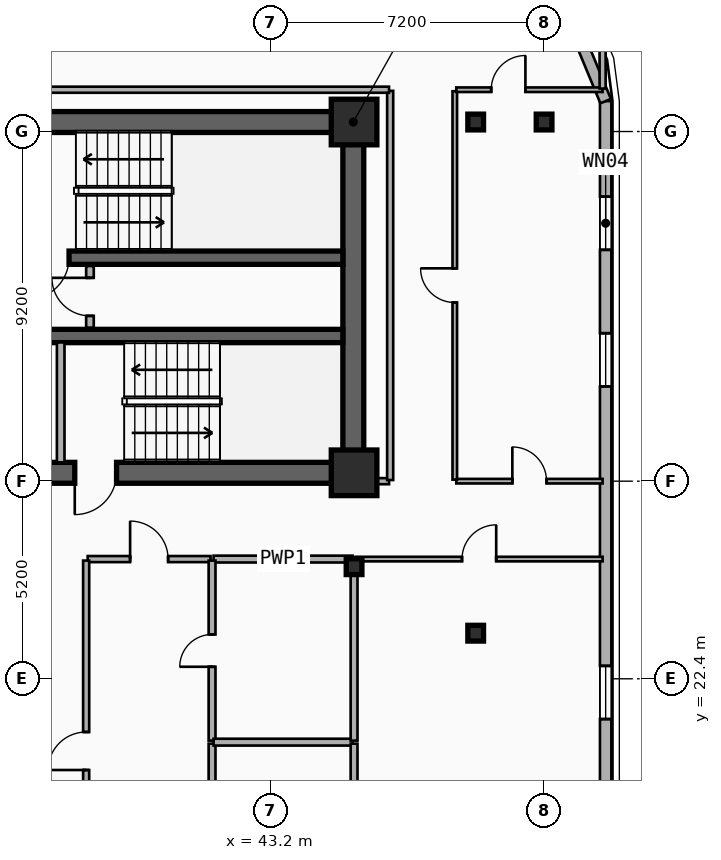
"""IFC4 building model, lengths in metres.
Left out: names, types, materials, properties, quantities, classifications, styles, units other than length and angle.
Written with IfcOpenShell. Run it as: python <this file> out.ifc"""

import sys

from ifc_helpers import new_model, si_unit, direction, frame, frame_2d, origin, origin_2d, place, context, subcontext, project, spatial, rectangle, i_section, extrude, element, fill, save


model = new_model("IFC4")
c1 = context("Model", 3, precision=1e-05, world=origin(), true_north=direction((0.0, 1.0)))
c2 = subcontext(c1, "Body", "Model", "MODEL_VIEW")
j1 = project(units=[si_unit("LENGTHUNIT", "METRE"), si_unit("PLANEANGLEUNIT", "RADIAN")], contexts=[c1])
p1 = place(None, origin())
s1 = spatial("IfcSite", under=j1, at=p1, CompositionType="ELEMENT")
p2 = place(p1, origin())
s2 = spatial("IfcBuilding", under=s1, at=p2, CompositionType="ELEMENT")
p3 = place(p2, frame((0.0, 0.0, 176.75)))
s3 = spatial("IfcBuildingStorey", under=s2, at=p3, CompositionType="ELEMENT", Elevation=176.75)
p4 = place(p3, frame((12.15, 37.05, 0.0), z_axis=(0.0, 0.0, 1.0), x_axis=(1.0, 0.0, 0.0)))
e1 = element("IfcWall", 1, at=p4, inside=s3, PredefinedType="SHEAR", context=c2, shape_type="SweptSolid", body=[
    extrude(rectangle(XDim=33.23, YDim=0.55, at=frame_2d((16.615, 0.0))), origin(), (0.0, 0.0, 1.0), 3.55),
])
p5 = place(p3, frame((45.38, 27.82, 0.0), z_axis=(0.0, 0.0, 1.0), x_axis=(-1.0, 0.0, 0.0)))
e2 = element("IfcWall", 2, at=p5, inside=s3, PredefinedType="SHEAR", context=c2, shape_type="SweptSolid", body=[
    extrude(rectangle(XDim=12.23, YDim=0.55, at=frame_2d((6.115, 0.0))), origin(), (0.0, 0.0, 1.0), 3.55),
])
p6 = place(p5, frame((9.93, 0.0, 0.0)))
e3 = element("IfcOpeningElement", 3, at=p6, cuts=e2, PredefinedType="OPENING", context=c2, shape_type="SweptSolid", body=[
    extrude(rectangle(XDim=1.1, YDim=2.15, at=frame_2d((0.55, 1.075))), frame((0.0, 0.285, 0.0), z_axis=(0.0, -1.0, 0.0), x_axis=(1.0, 0.0, 0.0)), (0.0, 0.0, 1.0), 0.57),
])
p7 = place(p5, frame((6.23, 0.0, 0.0)))
e4 = element("IfcOpeningElement", 4, at=p7, cuts=e2, PredefinedType="OPENING", context=c2, shape_type="SweptSolid", body=[
    extrude(rectangle(XDim=1.1, YDim=2.15, at=frame_2d((0.55, 1.075))), frame((0.0, 0.285, 0.0), z_axis=(0.0, -1.0, 0.0), x_axis=(1.0, 0.0, 0.0)), (0.0, 0.0, 1.0), 0.57),
])
p8 = place(p3, frame((45.38, 28.095, 0.0), z_axis=(0.0, 0.0, 1.0), x_axis=(0.0, 1.0, 0.0)))
e5 = element("IfcWall", 5, at=p8, inside=s3, PredefinedType="SHEAR", context=c2, shape_type="SweptSolid", body=[
    extrude(rectangle(XDim=8.68, YDim=0.55, at=frame_2d((4.34, 0.0))), origin(), (0.0, 0.0, 1.0), 3.55),
])
p9 = place(p3, frame((45.105, 33.48, 0.0), z_axis=(0.0, 0.0, 1.0), x_axis=(-1.0, 0.0, 0.0)))
e6 = element("IfcWall", 6, at=p9, inside=s3, PredefinedType="SHEAR", context=c2, shape_type="SweptSolid", body=[
    extrude(rectangle(XDim=8.55, YDim=0.35, at=frame_2d((4.275, 0.0))), origin(), (0.0, 0.0, 1.0), 3.55),
])
p10 = place(p9, frame((7.205, 0.0, 0.0)))
e7 = element("IfcOpeningElement", 7, at=p10, cuts=e6, PredefinedType="OPENING", context=c2, shape_type="SweptSolid", body=[
    extrude(rectangle(XDim=1.1, YDim=2.15, at=frame_2d((0.55, 1.075))), frame((0.0, 0.185, 0.0), z_axis=(0.0, -1.0, 0.0), x_axis=(1.0, 0.0, 0.0)), (0.0, 0.0, 1.0), 0.37),
])
p11 = place(p3, frame((36.555, 31.42, 0.0), z_axis=(0.0, 0.0, 1.0), x_axis=(1.0, 0.0, 0.0)))
e8 = element("IfcWall", 8, at=p11, inside=s3, PredefinedType="SHEAR", context=c2, shape_type="SweptSolid", body=[
    extrude(rectangle(XDim=8.55, YDim=0.35, at=frame_2d((4.275, 0.0))), origin(), (0.0, 0.0, 1.0), 3.55),
])
for number, where, z_axis, x_axis in (
    (9, (45.4, 27.82, 0.0), (0.0, 0.0, 1.0), (1.0, 0.0, 0.0)),
    (10, (45.4, 37.05, 0.0), (0.0, 0.0, 1.0), (1.0, 0.0, 0.0)),
):
    element("IfcColumn", number, at=place(p3, frame(where, z_axis=z_axis, x_axis=x_axis)), inside=s3, PredefinedType="COLUMN", context=c2, shape_type="SweptSolid", body=[
        extrude(rectangle(XDim=1.2, YDim=1.2, at=origin_2d()), origin(), (0.0, 0.0, 1.0), 3.55),
    ])
for number, where, z_axis, x_axis in (
    (11, (45.4, 25.35, 0.0), (0.0, 0.0, 1.0), (1.0, 0.0, 0.0)),
    (12, (48.6, 23.6, 0.0), (0.0, 0.0, 1.0), (1.0, 0.0, 0.0)),
    (13, (48.6, 37.05, 0.0), (0.0, 0.0, 1.0), (1.0, 0.0, 0.0)),
    (14, (50.4, 37.05, 0.0), (0.0, 0.0, 1.0), (1.0, 0.0, 0.0)),
):
    element("IfcColumn", number, at=place(p3, frame(where, z_axis=z_axis, x_axis=x_axis)), inside=s3, PredefinedType="COLUMN", context=c2, shape_type="SweptSolid", body=[
        extrude(i_section(OverallWidth=0.413, OverallDepth=0.415, WebThickness=0.03, FlangeThickness=0.047, FilletRadius=0.015, at=origin_2d()), origin(), (0.0, 0.0, 1.0), 3.55),
    ])
p12 = place(p3, frame((52.02, 37.6, 0.0), z_axis=(0.0, 0.0, 1.0), x_axis=(0.0, -1.0, 0.0)))
e15 = element("IfcWall", 15, at=p12, inside=s3, PredefinedType="SOLIDWALL", context=c2, shape_type="SweptSolid", body=[
    extrude(rectangle(XDim=23.0, YDim=0.3, at=frame_2d((11.5, 0.0))), origin(), (0.0, 0.0, 1.0), 3.29),
])
p13 = place(p12, frame((2.513, 0.0, 0.34)))
e16 = element("IfcOpeningElement", 16, at=p13, cuts=e15, PredefinedType="OPENING", context=c2, shape_type="SweptSolid", body=[
    extrude(rectangle(XDim=1.4, YDim=2.1, at=frame_2d((0.7, 1.05))), frame((0.0, 0.16, 0.0), z_axis=(0.0, -1.0, 0.0), x_axis=(1.0, 0.0, 0.0)), (0.0, 0.0, 1.0), 0.32),
])
p14 = place(p12, frame((6.107, 0.0, 0.34)))
e17 = element("IfcOpeningElement", 17, at=p14, cuts=e15, PredefinedType="OPENING", context=c2, shape_type="SweptSolid", body=[
    extrude(rectangle(XDim=1.4, YDim=2.1, at=frame_2d((0.7, 1.05))), frame((0.0, 0.16, 0.0), z_axis=(0.0, -1.0, 0.0), x_axis=(1.0, 0.0, 0.0)), (0.0, 0.0, 1.0), 0.32),
])
p15 = place(p12, frame((14.86, 0.0, 0.34)))
e18 = element("IfcOpeningElement", 18, at=p15, cuts=e15, PredefinedType="OPENING", context=c2, shape_type="SweptSolid", body=[
    extrude(rectangle(XDim=1.4, YDim=2.1, at=frame_2d((0.7, 1.05))), frame((0.0, 0.16, 0.0), z_axis=(0.0, -1.0, 0.0), x_axis=(1.0, 0.0, 0.0)), (0.0, 0.0, 1.0), 0.32),
])
p16 = place(p12, frame((18.77, 0.0, 0.34)))
e19 = element("IfcOpeningElement", 19, at=p16, cuts=e15, PredefinedType="OPENING", context=c2, shape_type="SweptSolid", body=[
    extrude(rectangle(XDim=1.4, YDim=2.1, at=frame_2d((0.7, 1.05))), frame((0.0, 0.16, 0.0), z_axis=(0.0, -1.0, 0.0), x_axis=(1.0, 0.0, 0.0)), (0.0, 0.0, 1.0), 0.32),
])
p17 = place(p3, frame((50.843, 40.443, 0.0), z_axis=(0.0, 0.0, 1.0), x_axis=(0.382704529509, -0.923870793506, 0.0)))
e20 = element("IfcWall", 20, at=p17, inside=s3, PredefinedType="SOLIDWALL", context=c2, shape_type="SweptSolid", body=[
    extrude(rectangle(XDim=3.077, YDim=0.3, at=frame_2d((1.538, 0.0))), origin(), (0.0, 0.0, 1.0), 3.29),
])
p18 = place(p3, frame((37.68, 28.095, 0.0), z_axis=(0.0, 0.0, 1.0), x_axis=(0.0, 1.0, 0.0)))
e21 = element("IfcWall", 21, at=p18, inside=s3, PredefinedType="PARTITIONING", context=c2, shape_type="SweptSolid", body=[
    extrude(rectangle(XDim=3.155, YDim=0.2, at=frame_2d((1.578, 0.0))), origin(), (0.0, 0.0, 1.0), 2.67),
])
p19 = place(p3, frame((38.45, 31.64, 0.0), z_axis=(0.0, 0.0, 1.0), x_axis=(0.0, 1.0, 0.0)))
e22 = element("IfcWall", 22, at=p19, inside=s3, PredefinedType="PARTITIONING", context=c2, shape_type="SweptSolid", body=[
    extrude(rectangle(XDim=1.62, YDim=0.2, at=frame_2d((0.81, 0.0))), origin(), (0.0, 0.0, 1.0), 3.29),
])
p20 = place(p19, frame((0.31, 0.0, 0.0)))
e23 = element("IfcOpeningElement", 23, at=p20, cuts=e22, PredefinedType="OPENING", context=c2, shape_type="SweptSolid", body=[
    extrude(rectangle(XDim=1.0, YDim=2.15, at=frame_2d((0.5, 1.075))), frame((0.0, 0.11, 0.0), z_axis=(0.0, -1.0, 0.0), x_axis=(1.0, 0.0, 0.0)), (0.0, 0.0, 1.0), 0.22),
])
p21 = place(p3, frame((48.09, 27.6, 0.0), z_axis=(0.0, 0.0, 1.0), x_axis=(1.0, 0.0, 0.0)))
e24 = element("IfcWall", 24, at=p21, inside=s3, PredefinedType="PARTITIONING", context=c2, shape_type="SweptSolid", body=[
    extrude(rectangle(XDim=3.85, YDim=0.12, at=frame_2d((1.925, 0.0))), origin(), (0.0, 0.0, 1.0), 2.62),
])
p22 = place(p21, frame((1.475, 0.0, 0.0)))
e25 = element("IfcOpeningElement", 25, at=p22, cuts=e24, PredefinedType="OPENING", context=c2, shape_type="SweptSolid", body=[
    extrude(rectangle(XDim=0.9, YDim=2.1, at=frame_2d((0.45, 1.05))), frame((0.0, 0.07, 0.0), z_axis=(0.0, -1.0, 0.0), x_axis=(1.0, 0.0, 0.0)), (0.0, 0.0, 1.0), 0.14),
])
p23 = place(p3, frame((38.39, 25.55, 0.0), z_axis=(0.0, 0.0, 1.0), x_axis=(1.0, 0.0, 0.0)))
e26 = element("IfcWall", 26, at=p23, inside=s3, PredefinedType="PARTITIONING", context=c2, shape_type="SweptSolid", body=[
    extrude(rectangle(XDim=3.233, YDim=0.16, at=frame_2d((1.617, 0.0))), origin(), (0.0, 0.0, 1.0), 3.29),
])
p24 = place(p23, frame((1.116, 0.0, 0.0)))
e27 = element("IfcOpeningElement", 27, at=p24, cuts=e26, PredefinedType="OPENING", context=c2, shape_type="SweptSolid", body=[
    extrude(rectangle(XDim=1.0, YDim=2.15, at=frame_2d((0.5, 1.075))), frame((0.0, 0.09, 0.0), z_axis=(0.0, -1.0, 0.0), x_axis=(1.0, 0.0, 0.0)), (0.0, 0.0, 1.0), 0.18),
])
p25 = place(p3, frame((41.703, 25.55, 0.0), z_axis=(0.0, 0.0, 1.0), x_axis=(1.0, 0.0, 0.0)))
e28 = element("IfcWall", 28, at=p25, inside=s3, PredefinedType="PLUMBINGWALL", context=c2, shape_type="SweptSolid", body=[
    extrude(rectangle(XDim=3.657, YDim=0.18, at=frame_2d((1.829, 0.0))), origin(), (0.0, 0.0, 1.0), 2.37),
])
p26 = place(p3, frame((45.44, 25.55, 0.0), z_axis=(0.0, 0.0, 1.0), x_axis=(1.0, 0.0, 0.0)))
e29 = element("IfcWall", 29, at=p26, inside=s3, PredefinedType="PARTITIONING", context=c2, shape_type="SweptSolid", body=[
    extrude(rectangle(XDim=6.5, YDim=0.12, at=frame_2d((3.25, 0.0))), origin(), (0.0, 0.0, 1.0), 2.37),
])
p27 = place(p26, frame((2.8, 0.0, 0.0)))
e30 = element("IfcOpeningElement", 30, at=p27, cuts=e29, PredefinedType="OPENING", context=c2, shape_type="SweptSolid", body=[
    extrude(rectangle(XDim=0.9, YDim=2.1, at=frame_2d((0.45, 1.05))), frame((0.0, 0.07, 0.0), z_axis=(0.0, -1.0, 0.0), x_axis=(1.0, 0.0, 0.0)), (0.0, 0.0, 1.0), 0.14),
])
p28 = place(p3, frame((48.05, 27.64, 0.0), z_axis=(0.0, 0.0, 1.0), x_axis=(0.0, 1.0, 0.0)))
e31 = element("IfcWall", 31, at=p28, inside=s3, PredefinedType="PARTITIONING", context=c2, shape_type="SweptSolid", body=[
    extrude(rectangle(XDim=10.22, YDim=0.12, at=frame_2d((5.11, 0.0))), origin(), (0.0, 0.0, 1.0), 2.77),
])
p29 = place(p28, frame((4.66, 0.0, 0.0)))
e32 = element("IfcOpeningElement", 32, at=p29, cuts=e31, PredefinedType="OPENING", context=c2, shape_type="SweptSolid", body=[
    extrude(rectangle(XDim=0.9, YDim=2.1, at=frame_2d((0.45, 1.05))), frame((0.0, 0.07, 0.0), z_axis=(0.0, -1.0, 0.0), x_axis=(1.0, 0.0, 0.0)), (0.0, 0.0, 1.0), 0.14),
])
p30 = place(p3, frame((48.09, 37.9, 0.0), z_axis=(0.0, 0.0, 1.0), x_axis=(1.0, 0.0, 0.0)))
e33 = element("IfcWall", 33, at=p30, inside=s3, PredefinedType="PARTITIONING", context=c2, shape_type="SweptSolid", body=[
    extrude(rectangle(XDim=3.85, YDim=0.12, at=frame_2d((1.925, 0.0))), origin(), (0.0, 0.0, 1.0), 3.29),
])
p31 = place(p30, frame((0.919, 0.0, 0.0)))
e34 = element("IfcOpeningElement", 34, at=p31, cuts=e33, PredefinedType="OPENING", context=c2, shape_type="SweptSolid", body=[
    extrude(rectangle(XDim=0.9, YDim=2.1, at=frame_2d((0.45, 1.05))), frame((0.0, 0.07, 0.0), z_axis=(0.0, -1.0, 0.0), x_axis=(1.0, 0.0, 0.0)), (0.0, 0.0, 1.0), 0.14),
])
p32 = place(p3, frame((38.35, 15.49, 0.0), z_axis=(0.0, 0.0, 1.0), x_axis=(0.0, 1.0, 0.0)))
e35 = element("IfcWall", 35, at=p32, inside=s3, PredefinedType="PARTITIONING", context=c2, shape_type="SweptSolid", body=[
    extrude(rectangle(XDim=10.02, YDim=0.16, at=frame_2d((5.01, 0.0))), origin(), (0.0, 0.0, 1.0), 2.77),
])
p33 = place(p32, frame((4.51, 0.0, 0.0)))
e36 = element("IfcOpeningElement", 36, at=p33, cuts=e35, PredefinedType="OPENING", context=c2, shape_type="SweptSolid", body=[
    extrude(rectangle(XDim=1.0, YDim=2.15, at=frame_2d((0.5, 1.075))), frame((0.0, 0.09, 0.0), z_axis=(0.0, -1.0, 0.0), x_axis=(1.0, 0.0, 0.0)), (0.0, 0.0, 1.0), 0.18),
])
p34 = place(p3, frame((41.663, 14.313, 0.0), z_axis=(0.0, 0.0, 1.0), x_axis=(0.0, 1.0, 0.0)))
e37 = element("IfcWall", 37, at=p34, inside=s3, PredefinedType="PLUMBINGWALL", context=c2, shape_type="SweptSolid", body=[
    extrude(rectangle(XDim=6.38, YDim=0.18, at=frame_2d((3.19, 0.0))), origin(), (0.0, 0.0, 1.0), 2.77),
])
p35 = place(p34, frame((2.69, 0.0, 0.0)))
e38 = element("IfcOpeningElement", 38, at=p35, cuts=e37, PredefinedType="OPENING", context=c2, shape_type="SweptSolid", body=[
    extrude(rectangle(XDim=1.0, YDim=2.15, at=frame_2d((0.5, 1.075))), frame((0.0, 0.1, 0.0), z_axis=(0.0, -1.0, 0.0), x_axis=(1.0, 0.0, 0.0)), (0.0, 0.0, 1.0), 0.2),
])
p36 = place(p3, frame((41.663, 20.773, 0.0), z_axis=(0.0, 0.0, 1.0), x_axis=(0.0, 1.0, 0.0)))
e39 = element("IfcWall", 39, at=p36, inside=s3, PredefinedType="PLUMBINGWALL", context=c2, shape_type="SweptSolid", body=[
    extrude(rectangle(XDim=4.737, YDim=0.18, at=frame_2d((2.369, 0.0))), origin(), (0.0, 0.0, 1.0), 2.77),
])
p37 = place(p36, frame((1.944, 0.0, 0.0)))
e40 = element("IfcOpeningElement", 40, at=p37, cuts=e39, PredefinedType="OPENING", context=c2, shape_type="SweptSolid", body=[
    extrude(rectangle(XDim=0.85, YDim=2.1, at=frame_2d((0.425, 1.05))), frame((0.0, 0.1, 0.0), z_axis=(0.0, -1.0, 0.0), x_axis=(1.0, 0.0, 0.0)), (0.0, 0.0, 1.0), 0.2),
])
p38 = place(p3, frame((41.703, 20.733, 0.0), z_axis=(0.0, 0.0, 1.0), x_axis=(1.0, 0.0, 0.0)))
e41 = element("IfcWall", 41, at=p38, inside=s3, PredefinedType="PLUMBINGWALL", context=c2, shape_type="SweptSolid", body=[
    extrude(rectangle(XDim=3.657, YDim=0.18, at=frame_2d((1.829, 0.0))), origin(), (0.0, 0.0, 1.0), 2.37),
])
p39 = place(p3, frame((45.4, 14.313, 0.0), z_axis=(0.0, 0.0, 1.0), x_axis=(0.0, 1.0, 0.0)))
e42 = element("IfcWall", 42, at=p39, inside=s3, PredefinedType="PLUMBINGWALL", context=c2, shape_type="SweptSolid", body=[
    extrude(rectangle(XDim=6.38, YDim=0.18, at=frame_2d((3.19, 0.0))), origin(), (0.0, 0.0, 1.0), 2.37),
])
p40 = place(p3, frame((45.4, 20.773, 0.0), z_axis=(0.0, 0.0, 1.0), x_axis=(0.0, 1.0, 0.0)))
e43 = element("IfcWall", 43, at=p40, inside=s3, PredefinedType="PLUMBINGWALL", context=c2, shape_type="SweptSolid", body=[
    extrude(rectangle(XDim=4.737, YDim=0.18, at=frame_2d((2.369, 0.0))), origin(), (0.0, 0.0, 1.0), 2.37),
])
p41 = place(p3, frame((45.41, 27.6, 0.0), z_axis=(0.0, 0.0, 1.0), x_axis=(1.0, 0.0, 0.0)))
e44 = element("IfcWall", 44, at=p41, inside=s3, PredefinedType="PARTITIONING", context=c2, shape_type="SweptSolid", body=[
    extrude(rectangle(XDim=0.91, YDim=0.16, at=frame_2d((0.455, 0.0))), origin(), (0.0, 0.0, 1.0), 2.36),
])
p42 = place(p3, frame((46.35, 27.63, 0.0), z_axis=(0.0, 0.0, 1.0), x_axis=(0.0, 1.0, 0.0)))
e45 = element("IfcWall", 45, at=p42, inside=s3, PredefinedType="PARTITIONING", context=c2, shape_type="SweptSolid", body=[
    extrude(rectangle(XDim=10.24, YDim=0.16, at=frame_2d((5.12, 0.0))), origin(), (0.0, 0.0, 1.0), 2.77),
])
p43 = place(p3, frame((11.28, 37.9, 0.0), z_axis=(0.0, 0.0, 1.0), x_axis=(1.0, 0.0, 0.0)))
e46 = element("IfcWall", 46, at=p43, inside=s3, PredefinedType="PARTITIONING", context=c2, shape_type="SweptSolid", body=[
    extrude(rectangle(XDim=35.04, YDim=0.16, at=frame_2d((17.52, 0.0))), origin(), (0.0, 0.0, 1.0), 3.29),
])
p44 = place(p3, frame((51.94, 37.93, 0.0), z_axis=(0.0, 0.0, 1.0), x_axis=(0.0, 1.0, 0.0)))
e47 = element("IfcWall", 47, at=p44, inside=s3, PredefinedType="PARTITIONING", context=c2, shape_type="SweptSolid", body=[
    extrude(rectangle(XDim=1.44, YDim=0.16, at=frame_2d((0.72, 0.0))), origin(), (0.0, 0.0, 1.0), 3.29),
])
p45 = place(p13, origin())
e48 = element("IfcWindow", 48, at=p45, inside=s3, PartitioningType="SINGLE_PANEL", PredefinedType="WINDOW", context=c2, shape_type="SweptSolid", body=[
    extrude(rectangle(XDim=1.4, YDim=2.1, at=frame_2d((0.7, 1.05))), frame((0.0, 0.03, 0.0), z_axis=(0.0, -1.0, 0.0), x_axis=(1.0, 0.0, 0.0)), (0.0, 0.0, 1.0), 0.06),
])
fill(e16, e48)
p46 = place(p14, origin())
e49 = element("IfcWindow", 49, at=p46, inside=s3, PartitioningType="SINGLE_PANEL", PredefinedType="WINDOW", context=c2, shape_type="SweptSolid", body=[
    extrude(rectangle(XDim=1.4, YDim=2.1, at=frame_2d((0.7, 1.05))), frame((0.0, 0.03, 0.0), z_axis=(0.0, -1.0, 0.0), x_axis=(1.0, 0.0, 0.0)), (0.0, 0.0, 1.0), 0.06),
])
fill(e17, e49)
p47 = place(p15, origin())
e50 = element("IfcWindow", 50, at=p47, inside=s3, PartitioningType="SINGLE_PANEL", PredefinedType="WINDOW", context=c2, shape_type="SweptSolid", body=[
    extrude(rectangle(XDim=1.4, YDim=2.1, at=frame_2d((0.7, 1.05))), frame((0.0, 0.03, 0.0), z_axis=(0.0, -1.0, 0.0), x_axis=(1.0, 0.0, 0.0)), (0.0, 0.0, 1.0), 0.06),
])
fill(e18, e50)
p48 = place(p10, origin())
e51 = element("IfcDoor", 51, at=p48, inside=s3, OperationType="SINGLE_SWING_RIGHT", PredefinedType="DOOR", context=c2, shape_type="SweptSolid", body=[
    extrude(rectangle(XDim=1.1, YDim=2.15, at=frame_2d((0.55, 1.075))), frame((0.0, 0.025, 0.0), z_axis=(0.0, -1.0, 0.0), x_axis=(1.0, 0.0, 0.0)), (0.0, 0.0, 1.0), 0.05),
])
fill(e7, e51)
p49 = place(p7, origin())
e52 = element("IfcDoor", 52, at=p49, inside=s3, OperationType="SINGLE_SWING_RIGHT", PredefinedType="DOOR", context=c2, shape_type="SweptSolid", body=[
    extrude(rectangle(XDim=1.1, YDim=2.15, at=frame_2d((0.55, 1.075))), frame((0.0, 0.025, 0.0), z_axis=(0.0, -1.0, 0.0), x_axis=(1.0, 0.0, 0.0)), (0.0, 0.0, 1.0), 0.05),
])
fill(e4, e52)
p50 = place(p20, origin())
e53 = element("IfcDoor", 53, at=p50, inside=s3, OperationType="SINGLE_SWING_RIGHT", PredefinedType="DOOR", context=c2, shape_type="SweptSolid", body=[
    extrude(rectangle(XDim=1.0, YDim=2.15, at=frame_2d((0.5, 1.075))), frame((0.0, 0.025, 0.0), z_axis=(0.0, -1.0, 0.0), x_axis=(1.0, 0.0, 0.0)), (0.0, 0.0, 1.0), 0.05),
])
fill(e23, e53)
p51 = place(p22, origin())
e54 = element("IfcDoor", 54, at=p51, inside=s3, OperationType="SINGLE_SWING_LEFT", PredefinedType="DOOR", context=c2, shape_type="SweptSolid", body=[
    extrude(rectangle(XDim=0.9, YDim=2.1, at=frame_2d((0.45, 1.05))), frame((0.0, 0.025, 0.0), z_axis=(0.0, -1.0, 0.0), x_axis=(1.0, 0.0, 0.0)), (0.0, 0.0, 1.0), 0.05),
])
fill(e25, e54)
p52 = place(p24, origin())
e55 = element("IfcDoor", 55, at=p52, inside=s3, OperationType="SINGLE_SWING_LEFT", PredefinedType="DOOR", context=c2, shape_type="SweptSolid", body=[
    extrude(rectangle(XDim=1.0, YDim=2.15, at=frame_2d((0.5, 1.075))), frame((0.0, 0.025, 0.0), z_axis=(0.0, -1.0, 0.0), x_axis=(1.0, 0.0, 0.0)), (0.0, 0.0, 1.0), 0.05),
])
fill(e27, e55)
p53 = place(p27, origin())
e56 = element("IfcDoor", 56, at=p53, inside=s3, OperationType="SINGLE_SWING_RIGHT", PredefinedType="DOOR", context=c2, shape_type="SweptSolid", body=[
    extrude(rectangle(XDim=0.9, YDim=2.1, at=frame_2d((0.45, 1.05))), frame((0.0, 0.025, 0.0), z_axis=(0.0, -1.0, 0.0), x_axis=(1.0, 0.0, 0.0)), (0.0, 0.0, 1.0), 0.05),
])
fill(e30, e56)
p54 = place(p29, origin())
e57 = element("IfcDoor", 57, at=p54, inside=s3, OperationType="SINGLE_SWING_RIGHT", PredefinedType="DOOR", context=c2, shape_type="SweptSolid", body=[
    extrude(rectangle(XDim=0.9, YDim=2.1, at=frame_2d((0.45, 1.05))), frame((0.0, 0.025, 0.0), z_axis=(0.0, -1.0, 0.0), x_axis=(1.0, 0.0, 0.0)), (0.0, 0.0, 1.0), 0.05),
])
fill(e32, e57)
p55 = place(p31, origin())
e58 = element("IfcDoor", 58, at=p55, inside=s3, OperationType="SINGLE_SWING_RIGHT", PredefinedType="DOOR", context=c2, shape_type="SweptSolid", body=[
    extrude(rectangle(XDim=0.9, YDim=2.1, at=frame_2d((0.45, 1.05))), frame((0.0, 0.025, 0.0), z_axis=(0.0, -1.0, 0.0), x_axis=(1.0, 0.0, 0.0)), (0.0, 0.0, 1.0), 0.05),
])
fill(e34, e58)
p56 = place(p33, origin())
e59 = element("IfcDoor", 59, at=p56, inside=s3, OperationType="SINGLE_SWING_LEFT", PredefinedType="DOOR", context=c2, shape_type="SweptSolid", body=[
    extrude(rectangle(XDim=1.0, YDim=2.15, at=frame_2d((0.5, 1.075))), frame((0.0, 0.025, 0.0), z_axis=(0.0, -1.0, 0.0), x_axis=(1.0, 0.0, 0.0)), (0.0, 0.0, 1.0), 0.05),
])
fill(e36, e59)
p57 = place(p37, origin())
e60 = element("IfcDoor", 60, at=p57, inside=s3, OperationType="SINGLE_SWING_LEFT", PredefinedType="DOOR", context=c2, shape_type="SweptSolid", body=[
    extrude(rectangle(XDim=0.85, YDim=2.1, at=frame_2d((0.425, 1.05))), frame((0.0, 0.025, 0.0), z_axis=(0.0, -1.0, 0.0), x_axis=(1.0, 0.0, 0.0)), (0.0, 0.0, 1.0), 0.05),
])
fill(e40, e60)
save(model, sys.argv[1])
